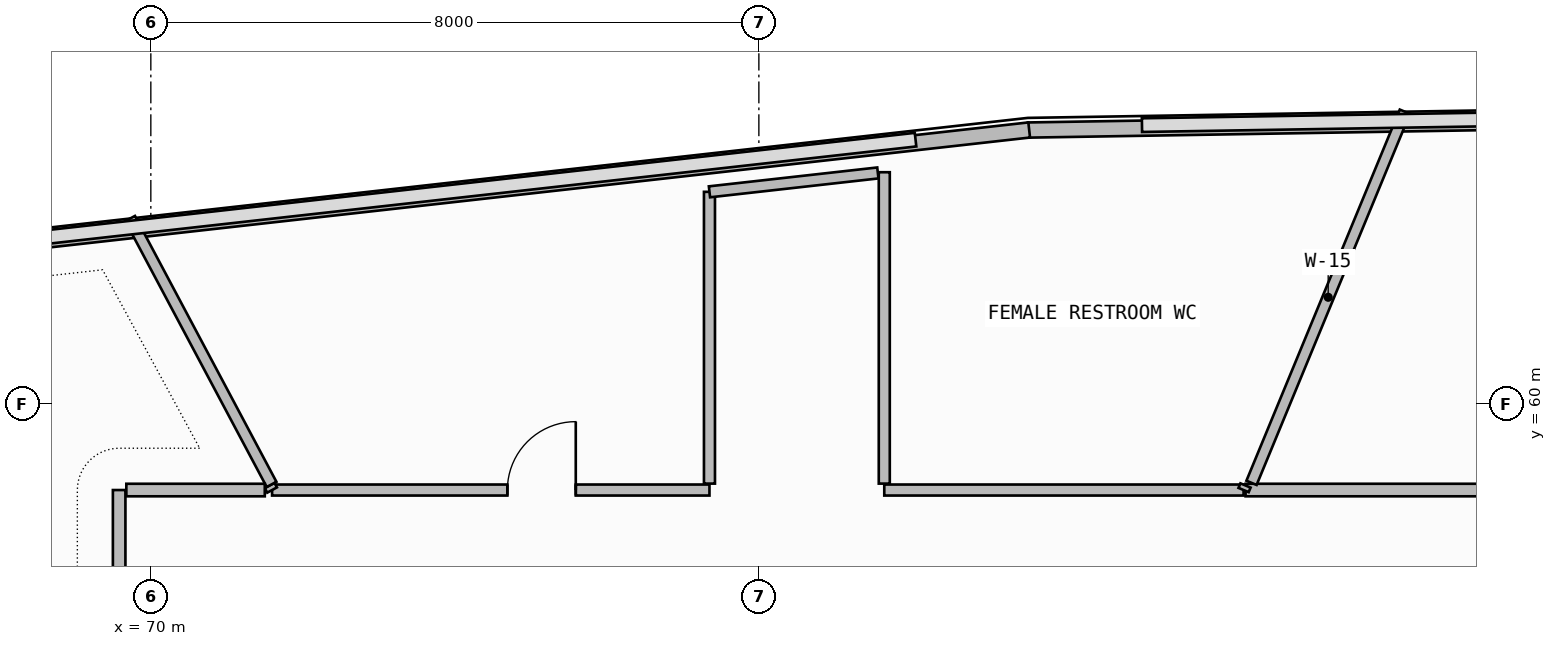
"""IFC4 building model, lengths in metres.
Left out: names, types, materials, properties, quantities, classifications, styles, units other than length and angle.
Written with IfcOpenShell. Run it as: python <this file> out.ifc"""

import sys

from ifc_helpers import new_model, si_unit, direction, frame, frame_2d, origin, place, context, subcontext, project, spatial, rectangle, extrude, element, fill, save


model = new_model("IFC4")
c1 = context("Model", 3, precision=1e-05, world=origin(), true_north=direction((0.0, 1.0)))
c2 = subcontext(c1, "Body", "Model", "MODEL_VIEW")
j1 = project(units=[si_unit("LENGTHUNIT", "METRE"), si_unit("PLANEANGLEUNIT", "RADIAN")], contexts=[c1])
p1 = place(None, origin())
s1 = spatial("IfcSite", under=j1, at=p1, CompositionType="ELEMENT")
p2 = place(p1, origin())
s2 = spatial("IfcBuilding", under=s1, at=p2, CompositionType="ELEMENT")
p3 = place(p2, frame((0.0, 0.0, 292.42)))
s3 = spatial("IfcBuildingStorey", under=s2, at=p3, CompositionType="ELEMENT", Elevation=292.42)
p4 = place(p3, frame((111.271, 64.092, 0.0), z_axis=(0.0, 0.0, 1.0), x_axis=(-0.999864741935, -0.016446818413, 0.0)))
e1 = element("IfcWall", 1, at=p4, inside=s3, PredefinedType="PARAPET", context=c2, shape_type="SweptSolid", body=[
    extrude(rectangle(XDim=29.733, YDim=0.2, at=frame_2d((14.866, 0.0))), origin(), (0.0, 0.0, 1.0), 1.15),
])
p5 = place(p3, frame((81.557, 63.604, 0.0), z_axis=(0.0, 0.0, 1.0), x_axis=(-0.993775831398, -0.111398370403, 0.0)))
e2 = element("IfcWall", 2, at=p5, inside=s3, PredefinedType="PARAPET", context=c2, shape_type="SweptSolid", body=[
    extrude(rectangle(XDim=29.764, YDim=0.2, at=frame_2d((14.882, 0.0))), origin(), (0.0, 0.0, 1.0), 1.15),
])
p6 = place(p3, frame((87.872, 58.867, 0.0), z_axis=(0.0, 0.0, 1.0), x_axis=(-1.0, 0.0, 0.0)))
e3 = element("IfcWall", 3, at=p6, inside=s3, PredefinedType="PARTITIONING", context=c2, shape_type="SweptSolid", body=[
    extrude(rectangle(XDim=3.469, YDim=0.165, at=frame_2d((1.734, 0.0))), origin(), (0.0, 0.0, 1.0), 5.045),
])
p7 = place(p3, frame((84.482, 58.961, 0.0), z_axis=(0.0, 0.0, 1.0), x_axis=(0.381890578818, 0.92420754477, 0.0)))
e4 = element("IfcWall", 4, at=p7, inside=s3, PredefinedType="PARTITIONING", context=c2, shape_type="SweptSolid", body=[
    extrude(rectangle(XDim=5.284, YDim=0.145, at=frame_2d((2.642, 0.0))), origin(), (0.0, 0.0, 1.0), 5.56),
])
p8 = place(p3, frame((77.35, 58.867, 0.0), z_axis=(0.0, 0.0, 1.0), x_axis=(-1.0, 0.0, 0.0)))
e5 = element("IfcWall", 5, at=p8, inside=s3, PredefinedType="PARTITIONING", context=c2, shape_type="SweptSolid", body=[
    extrude(rectangle(XDim=5.755, YDim=0.145, at=frame_2d((2.877, 0.0))), origin(), (0.0, 0.0, 1.0), 5.56),
])
p9 = place(p8, frame((1.759, 0.0, 0.0)))
e6 = element("IfcOpeningElement", 6, at=p9, cuts=e5, PredefinedType="OPENING", context=c2, shape_type="SweptSolid", body=[
    extrude(rectangle(XDim=0.9, YDim=2.1, at=frame_2d((0.45, 1.05))), frame((0.0, 0.083, 0.0), z_axis=(0.0, -1.0, 0.0), x_axis=(1.0, 0.0, 0.0)), (0.0, 0.0, 1.0), 0.165),
])
p10 = place(p3, frame((84.377, 58.867, 0.0), z_axis=(0.0, 0.0, 1.0), x_axis=(-1.0, 0.0, 0.0)))
e7 = element("IfcWall", 7, at=p10, inside=s3, PredefinedType="PARTITIONING", context=c2, shape_type="SweptSolid", body=[
    extrude(rectangle(XDim=4.728, YDim=0.145, at=frame_2d((2.364, 0.0))), origin(), (0.0, 0.0, 1.0), 5.56),
])
p11 = place(p3, frame((79.65, 58.951, 0.0), z_axis=(0.0, 0.0, 1.0), x_axis=(0.0, 1.0, 0.0)))
e8 = element("IfcWall", 8, at=p11, inside=s3, PredefinedType="PARTITIONING", context=c2, shape_type="SweptSolid", body=[
    extrude(rectangle(XDim=4.096, YDim=0.145, at=frame_2d((2.048, 0.0))), origin(), (0.0, 0.0, 1.0), 5.56),
])
p12 = place(p3, frame((77.35, 62.79, 0.0), z_axis=(0.0, 0.0, 1.0), x_axis=(0.0, -1.0, 0.0)))
e9 = element("IfcWall", 9, at=p12, inside=s3, PredefinedType="PARTITIONING", context=c2, shape_type="SweptSolid", body=[
    extrude(rectangle(XDim=3.839, YDim=0.145, at=frame_2d((1.919, 0.0))), origin(), (0.0, 0.0, 1.0), 5.56),
])
p13 = place(p3, frame((79.565, 63.038, 0.0), z_axis=(0.0, 0.0, 1.0), x_axis=(-0.993777768559, -0.111381087792, 0.0)))
e10 = element("IfcWall", 10, at=p13, inside=s3, PredefinedType="PARTITIONING", context=c2, shape_type="SweptSolid", body=[
    extrude(rectangle(XDim=2.229, YDim=0.145, at=frame_2d((1.115, 0.0))), origin(), (0.0, 0.0, 1.0), 5.56),
])
p14 = place(p3, frame((71.595, 58.867, 0.0), z_axis=(0.0, 0.0, 1.0), x_axis=(-0.478351827629, 0.878168280573, 0.0)))
e11 = element("IfcWall", 11, at=p14, inside=s3, PredefinedType="PARTITIONING", context=c2, shape_type="SweptSolid", body=[
    extrude(rectangle(XDim=0.068, YDim=0.145, at=frame_2d((0.034, 0.0))), origin(), (0.0, 0.0, 1.0), 5.56),
])
p15 = place(p3, frame((84.403, 58.927, 0.0), z_axis=(0.0, 0.0, 1.0), x_axis=(-0.386212285798, -0.922409925304, 0.0)))
e12 = element("IfcWall", 12, at=p15, inside=s3, PredefinedType="PARTITIONING", context=c2, shape_type="SweptSolid", body=[
    extrude(rectangle(XDim=0.065, YDim=0.145, at=frame_2d((0.033, 0.0))), origin(), (0.0, 0.0, 1.0), 5.56),
])
p16 = place(p3, frame((71.589, 58.941, 0.0), z_axis=(0.0, 0.0, 1.0), x_axis=(-0.469769313207, 0.882789211742, 0.0)))
e13 = element("IfcWall", 13, at=p16, inside=s3, PredefinedType="PARTITIONING", context=c2, shape_type="SweptSolid", body=[
    extrude(rectangle(XDim=3.962, YDim=0.145, at=frame_2d((1.981, 0.0))), origin(), (0.0, 0.0, 1.0), 5.56),
])
p17 = place(p3, frame((69.583, 58.867, 0.0), z_axis=(0.0, 0.0, 1.0), x_axis=(0.0, -1.0, 0.0)))
e14 = element("IfcWall", 14, at=p17, inside=s3, PredefinedType="PARTITIONING", context=c2, shape_type="SweptSolid", body=[
    extrude(rectangle(XDim=8.134, YDim=0.165, at=frame_2d((4.067, 0.0))), origin(), (0.0, 0.0, 1.0), 5.045),
])
p18 = place(p17, frame((3.567, 0.0, 0.0)))
e15 = element("IfcOpeningElement", 15, at=p18, cuts=e14, PredefinedType="OPENING", context=c2, shape_type="SweptSolid", body=[
    extrude(rectangle(XDim=1.0, YDim=2.2, at=frame_2d((0.5, 1.1))), frame((0.0, 0.093, 0.0), z_axis=(0.0, -1.0, 0.0), x_axis=(1.0, 0.0, 0.0)), (0.0, 0.0, 1.0), 0.185),
])
p19 = place(p3, frame((71.499, 58.867, 0.0), z_axis=(0.0, 0.0, 1.0), x_axis=(-1.0, 0.0, 0.0)))
e16 = element("IfcWall", 16, at=p19, inside=s3, PredefinedType="PARTITIONING", context=c2, shape_type="SweptSolid", body=[
    extrude(rectangle(XDim=1.822, YDim=0.165, at=frame_2d((0.911, 0.0))), origin(), (0.0, 0.0, 1.0), 5.56),
])
p20 = place(p3, frame((69.489, 50.827, 0.0), z_axis=(0.0, 0.0, 1.0), x_axis=(-0.873486229604, 0.486848854053, 0.0)))
e17 = element("IfcWall", 17, at=p20, inside=s3, PredefinedType="PARTITIONING", context=c2, shape_type="SweptSolid", body=[
    extrude(rectangle(XDim=19.812, YDim=0.125, at=frame_2d((9.906, 0.0))), origin(), (0.0, 0.0, 1.0), 4.945),
])
p21 = place(p9, frame((0.9, 0.0, 0.0), z_axis=(0.0, 0.0, 1.0), x_axis=(-1.0, 0.0, 0.0)))
e18 = element("IfcDoor", 18, at=p21, inside=s3, OperationType="SINGLE_SWING_RIGHT", PredefinedType="DOOR", context=c2, shape_type="SweptSolid", body=[
    extrude(rectangle(XDim=0.9, YDim=2.1, at=frame_2d((0.45, 1.05))), frame((0.0, 0.025, 0.0), z_axis=(0.0, -1.0, 0.0), x_axis=(1.0, 0.0, 0.0)), (0.0, 0.0, 1.0), 0.05),
])
fill(e6, e18)
save(model, sys.argv[1])
